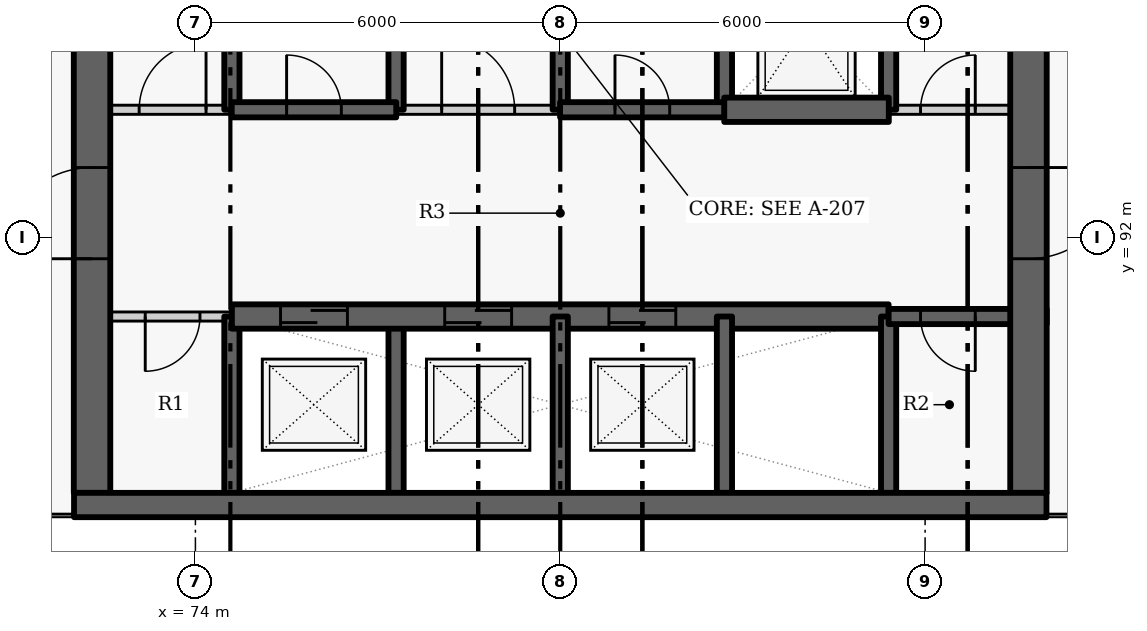
"""IFC4 building model, lengths in metres.
Left out: names, types, materials, properties, quantities, classifications, styles, units other than length and angle.
Written with IfcOpenShell. Run it as: python <this file> out.ifc"""

import sys

from ifc_helpers import new_model, si_unit, direction, frame, frame_2d, origin, place, context, subcontext, project, spatial, rectangle, extrude, element, fill, save


model = new_model("IFC4")
c1 = context("Model", 3, precision=1e-05, world=origin(), true_north=direction((0.0, 1.0)))
c2 = subcontext(c1, "Body", "Model", "MODEL_VIEW")
j1 = project(units=[si_unit("LENGTHUNIT", "METRE"), si_unit("PLANEANGLEUNIT", "RADIAN")], contexts=[c1])
p1 = place(None, origin())
s1 = spatial("IfcSite", under=j1, at=p1, CompositionType="ELEMENT")
p2 = place(p1, origin())
s2 = spatial("IfcBuilding", under=s1, at=p2, CompositionType="ELEMENT")
p3 = place(p2, frame((0.0, 0.0, 28.2)))
s3 = spatial("IfcBuildingStorey", under=s2, at=p3, CompositionType="ELEMENT", Elevation=28.2)
p4 = place(p3, frame((74.6, 87.8, -0.275), z_axis=(0.0, 0.0, 1.0), x_axis=(0.0, 1.0, 0.0)))
e1 = element("IfcWall", 1, at=p4, inside=s3, PredefinedType="SHEAR", context=c2, shape_type="SweptSolid", body=[
    extrude(rectangle(XDim=2.9, YDim=0.25, at=frame_2d((1.45, 0.0))), origin(), (0.0, 0.0, 1.0), 3.3),
])
p5 = place(p3, frame((74.6, 94.1, -0.275), z_axis=(0.0, 0.0, 1.0), x_axis=(0.0, 1.0, 0.0)))
e2 = element("IfcWall", 2, at=p5, inside=s3, PredefinedType="SHEAR", context=c2, shape_type="SweptSolid", body=[
    extrude(rectangle(XDim=2.8, YDim=0.25, at=frame_2d((1.4, 0.0))), origin(), (0.0, 0.0, 1.0), 3.3),
])
p6 = place(p3, frame((74.6, 90.7, 0.0), z_axis=(0.0, 0.0, 1.0), x_axis=(-1.0, 0.0, 0.0)))
e3 = element("IfcWall", 3, at=p6, inside=s3, PredefinedType="PARTITIONING", context=c2, shape_type="SweptSolid", body=[
    extrude(rectangle(XDim=2.6, YDim=0.15, at=frame_2d((1.3, 0.0))), origin(), (0.0, 0.0, 1.0), 3.025),
])
p7 = place(p6, frame((0.525, 0.0, 0.0)))
e4 = element("IfcOpeningElement", 4, at=p7, cuts=e3, PredefinedType="OPENING", context=c2, shape_type="SweptSolid", body=[
    extrude(rectangle(XDim=0.9, YDim=2.1, at=frame_2d((0.45, 1.05))), frame((0.0, 0.085, 0.0), z_axis=(0.0, -1.0, 0.0), x_axis=(1.0, 0.0, 0.0)), (0.0, 0.0, 1.0), 0.17),
])
p8 = place(p3, frame((72.3, 87.8, -0.275), z_axis=(0.0, 0.0, 1.0), x_axis=(0.0, 1.0, 0.0)))
e5 = element("IfcWall", 5, at=p8, inside=s3, PredefinedType="SHEAR", context=c2, shape_type="SweptSolid", body=[
    extrude(rectangle(XDim=9.1, YDim=0.6, at=frame_2d((4.55, 0.0))), origin(), (0.0, 0.0, 1.0), 3.3),
])
p9 = place(p8, frame((3.85, 0.0, 0.275)))
e6 = element("IfcOpeningElement", 6, at=p9, cuts=e5, PredefinedType="OPENING", context=c2, shape_type="SweptSolid", body=[
    extrude(rectangle(XDim=1.5, YDim=2.1, at=frame_2d((0.75, 1.05))), frame((0.0, 0.31, 0.0), z_axis=(0.0, -1.0, 0.0), x_axis=(1.0, 0.0, 0.0)), (0.0, 0.0, 1.0), 0.62),
])
p10 = place(p3, frame((77.3, 87.8, -0.275), z_axis=(0.0, 0.0, 1.0), x_axis=(0.0, 1.0, 0.0)))
e7 = element("IfcWall", 7, at=p10, inside=s3, PredefinedType="SHEAR", context=c2, shape_type="SweptSolid", body=[
    extrude(rectangle(XDim=2.9, YDim=0.25, at=frame_2d((1.45, 0.0))), origin(), (0.0, 0.0, 1.0), 3.3),
])
p11 = place(p3, frame((77.3, 94.1, -0.275), z_axis=(0.0, 0.0, 1.0), x_axis=(0.0, 1.0, 0.0)))
e8 = element("IfcWall", 8, at=p11, inside=s3, PredefinedType="SHEAR", context=c2, shape_type="SweptSolid", body=[
    extrude(rectangle(XDim=2.8, YDim=0.25, at=frame_2d((1.4, 0.0))), origin(), (0.0, 0.0, 1.0), 3.3),
])
p12 = place(p3, frame((74.6, 90.7, -0.275), z_axis=(0.0, 0.0, 1.0), x_axis=(1.0, 0.0, 0.0)))
e9 = element("IfcWall", 9, at=p12, inside=s3, PredefinedType="SHEAR", context=c2, shape_type="SweptSolid", body=[
    extrude(rectangle(XDim=10.8, YDim=0.4, at=frame_2d((5.4, 0.0))), origin(), (0.0, 0.0, 1.0), 3.3),
])
p13 = place(p12, frame((0.8, 0.0, 0.275)))
e10 = element("IfcOpeningElement", 10, at=p13, cuts=e9, PredefinedType="OPENING", context=c2, shape_type="SweptSolid", body=[
    extrude(rectangle(XDim=1.1, YDim=2.1, at=frame_2d((0.55, 1.05))), frame((0.0, 0.21, 0.0), z_axis=(0.0, -1.0, 0.0), x_axis=(1.0, 0.0, 0.0)), (0.0, 0.0, 1.0), 0.42),
])
p14 = place(p12, frame((3.5, 0.0, 0.275)))
e11 = element("IfcOpeningElement", 11, at=p14, cuts=e9, PredefinedType="OPENING", context=c2, shape_type="SweptSolid", body=[
    extrude(rectangle(XDim=1.1, YDim=2.1, at=frame_2d((0.55, 1.05))), frame((0.0, 0.21, 0.0), z_axis=(0.0, -1.0, 0.0), x_axis=(1.0, 0.0, 0.0)), (0.0, 0.0, 1.0), 0.42),
])
p15 = place(p12, frame((6.2, 0.0, 0.275)))
e12 = element("IfcOpeningElement", 12, at=p15, cuts=e9, PredefinedType="OPENING", context=c2, shape_type="SweptSolid", body=[
    extrude(rectangle(XDim=1.1, YDim=2.1, at=frame_2d((0.55, 1.05))), frame((0.0, 0.21, 0.0), z_axis=(0.0, -1.0, 0.0), x_axis=(1.0, 0.0, 0.0)), (0.0, 0.0, 1.0), 0.42),
])
p16 = place(p3, frame((80.0, 87.8, -0.275), z_axis=(0.0, 0.0, 1.0), x_axis=(0.0, 1.0, 0.0)))
e13 = element("IfcWall", 13, at=p16, inside=s3, PredefinedType="SHEAR", context=c2, shape_type="SweptSolid", body=[
    extrude(rectangle(XDim=2.9, YDim=0.25, at=frame_2d((1.45, 0.0))), origin(), (0.0, 0.0, 1.0), 3.3),
])
p17 = place(p3, frame((80.0, 94.1, -0.275), z_axis=(0.0, 0.0, 1.0), x_axis=(0.0, 1.0, 0.0)))
e14 = element("IfcWall", 14, at=p17, inside=s3, PredefinedType="SHEAR", context=c2, shape_type="SweptSolid", body=[
    extrude(rectangle(XDim=2.8, YDim=0.25, at=frame_2d((1.4, 0.0))), origin(), (0.0, 0.0, 1.0), 3.3),
])
p18 = place(p3, frame((82.7, 87.8, -0.275), z_axis=(0.0, 0.0, 1.0), x_axis=(0.0, 1.0, 0.0)))
e15 = element("IfcWall", 15, at=p18, inside=s3, PredefinedType="SHEAR", context=c2, shape_type="SweptSolid", body=[
    extrude(rectangle(XDim=2.9, YDim=0.25, at=frame_2d((1.45, 0.0))), origin(), (0.0, 0.0, 1.0), 3.3),
])
p19 = place(p3, frame((82.7, 94.1, -0.275), z_axis=(0.0, 0.0, 1.0), x_axis=(0.0, 1.0, 0.0)))
e16 = element("IfcWall", 16, at=p19, inside=s3, PredefinedType="SHEAR", context=c2, shape_type="SweptSolid", body=[
    extrude(rectangle(XDim=2.8, YDim=0.25, at=frame_2d((1.4, 0.0))), origin(), (0.0, 0.0, 1.0), 3.3),
])
p20 = place(p3, frame((85.4, 87.8, -0.275), z_axis=(0.0, 0.0, 1.0), x_axis=(0.0, 1.0, 0.0)))
e17 = element("IfcWall", 17, at=p20, inside=s3, PredefinedType="SHEAR", context=c2, shape_type="SweptSolid", body=[
    extrude(rectangle(XDim=2.9, YDim=0.25, at=frame_2d((1.45, 0.0))), origin(), (0.0, 0.0, 1.0), 3.3),
])
p21 = place(p3, frame((85.4, 94.1, -0.275), z_axis=(0.0, 0.0, 1.0), x_axis=(0.0, 1.0, 0.0)))
e18 = element("IfcWall", 18, at=p21, inside=s3, PredefinedType="SHEAR", context=c2, shape_type="SweptSolid", body=[
    extrude(rectangle(XDim=2.8, YDim=0.25, at=frame_2d((1.4, 0.0))), origin(), (0.0, 0.0, 1.0), 3.3),
])
p22 = place(p3, frame((88.0, 90.7, -0.275), z_axis=(0.0, 0.0, 1.0), x_axis=(-1.0, 0.0, 0.0)))
e19 = element("IfcWall", 19, at=p22, inside=s3, PredefinedType="SHEAR", context=c2, shape_type="SweptSolid", body=[
    extrude(rectangle(XDim=2.6, YDim=0.25, at=frame_2d((1.3, 0.0))), origin(), (0.0, 0.0, 1.0), 3.3),
])
p23 = place(p22, frame((1.175, 0.0, 0.275)))
e20 = element("IfcOpeningElement", 20, at=p23, cuts=e19, PredefinedType="OPENING", context=c2, shape_type="SweptSolid", body=[
    extrude(rectangle(XDim=0.9, YDim=2.1, at=frame_2d((0.45, 1.05))), frame((0.0, 0.135, 0.0), z_axis=(0.0, -1.0, 0.0), x_axis=(1.0, 0.0, 0.0)), (0.0, 0.0, 1.0), 0.27),
])
p24 = place(p3, frame((87.7, 103.4, -0.275), z_axis=(0.0, 0.0, 1.0), x_axis=(0.0, -1.0, 0.0)))
e21 = element("IfcWall", 21, at=p24, inside=s3, PredefinedType="SHEAR", context=c2, shape_type="SweptSolid", body=[
    extrude(rectangle(XDim=15.6, YDim=0.6, at=frame_2d((7.8, 0.0))), origin(), (0.0, 0.0, 1.0), 3.3),
])
p25 = place(p24, frame((10.25, 0.0, 0.275)))
e22 = element("IfcOpeningElement", 22, at=p25, cuts=e21, PredefinedType="OPENING", context=c2, shape_type="SweptSolid", body=[
    extrude(rectangle(XDim=1.5, YDim=2.1, at=frame_2d((0.75, 1.05))), frame((0.0, 0.31, 0.0), z_axis=(0.0, -1.0, 0.0), x_axis=(1.0, 0.0, 0.0)), (0.0, 0.0, 1.0), 0.62),
])
p26 = place(p24, frame((2.7, 0.0, 0.275)))
e23 = element("IfcOpeningElement", 23, at=p26, cuts=e21, PredefinedType="OPENING", context=c2, shape_type="SweptSolid", body=[
    extrude(rectangle(XDim=1.1, YDim=2.1, at=frame_2d((0.55, 1.05))), frame((0.0, 0.31, 0.0), z_axis=(0.0, -1.0, 0.0), x_axis=(1.0, 0.0, 0.0)), (0.0, 0.0, 1.0), 0.62),
])
p27 = place(p3, frame((72.0, 94.1, 0.0), z_axis=(0.0, 0.0, 1.0), x_axis=(1.0, 0.0, 0.0)))
e24 = element("IfcWall", 24, at=p27, inside=s3, PredefinedType="PARTITIONING", context=c2, shape_type="SweptSolid", body=[
    extrude(rectangle(XDim=2.603, YDim=0.15, at=frame_2d((1.302, 0.0))), origin(), (0.0, 0.0, 1.0), 3.025),
])
p28 = place(p27, frame((1.075, 0.0, 0.0)))
e25 = element("IfcOpeningElement", 25, at=p28, cuts=e24, PredefinedType="OPENING", context=c2, shape_type="SweptSolid", body=[
    extrude(rectangle(XDim=1.1, YDim=2.1, at=frame_2d((0.55, 1.05))), frame((0.0, 0.085, 0.0), z_axis=(0.0, -1.0, 0.0), x_axis=(1.0, 0.0, 0.0)), (0.0, 0.0, 1.0), 0.17),
])
p29 = place(p3, frame((77.297, 94.1, 0.0), z_axis=(0.0, 0.0, 1.0), x_axis=(1.0, 0.0, 0.0)))
e26 = element("IfcWall", 26, at=p29, inside=s3, PredefinedType="PARTITIONING", context=c2, shape_type="SweptSolid", body=[
    extrude(rectangle(XDim=2.706, YDim=0.15, at=frame_2d((1.353, 0.0))), origin(), (0.0, 0.0, 1.0), 3.025),
])
p30 = place(p29, frame((0.753, 0.0, 0.0)))
e27 = element("IfcOpeningElement", 27, at=p30, cuts=e26, PredefinedType="OPENING", context=c2, shape_type="SweptSolid", body=[
    extrude(rectangle(XDim=1.2, YDim=2.1, at=frame_2d((0.6, 1.05))), frame((0.0, 0.085, 0.0), z_axis=(0.0, -1.0, 0.0), x_axis=(1.0, 0.0, 0.0)), (0.0, 0.0, 1.0), 0.17),
])
p31 = place(p3, frame((85.397, 94.1, 0.0), z_axis=(0.0, 0.0, 1.0), x_axis=(1.0, 0.0, 0.0)))
e28 = element("IfcWall", 28, at=p31, inside=s3, PredefinedType="PARTITIONING", context=c2, shape_type="SweptSolid", body=[
    extrude(rectangle(XDim=2.603, YDim=0.15, at=frame_2d((1.302, 0.0))), origin(), (0.0, 0.0, 1.0), 3.025),
])
p32 = place(p31, frame((0.528, 0.0, 0.0)))
e29 = element("IfcOpeningElement", 29, at=p32, cuts=e28, PredefinedType="OPENING", context=c2, shape_type="SweptSolid", body=[
    extrude(rectangle(XDim=0.9, YDim=2.1, at=frame_2d((0.45, 1.05))), frame((0.0, 0.085, 0.0), z_axis=(0.0, -1.0, 0.0), x_axis=(1.0, 0.0, 0.0)), (0.0, 0.0, 1.0), 0.17),
])
p33 = place(p3, frame((74.597, 94.1, -0.275), z_axis=(0.0, 0.0, 1.0), x_axis=(1.0, 0.0, 0.0)))
e30 = element("IfcWall", 30, at=p33, inside=s3, PredefinedType="SHEAR", context=c2, shape_type="SweptSolid", body=[
    extrude(rectangle(XDim=2.706, YDim=0.25, at=frame_2d((1.353, 0.0))), origin(), (0.0, 0.0, 1.0), 3.3),
])
p34 = place(p33, frame((0.903, 0.0, 0.275)))
e31 = element("IfcOpeningElement", 31, at=p34, cuts=e30, PredefinedType="OPENING", context=c2, shape_type="SweptSolid", body=[
    extrude(rectangle(XDim=0.9, YDim=2.1, at=frame_2d((0.45, 1.05))), frame((0.0, 0.135, 0.0), z_axis=(0.0, -1.0, 0.0), x_axis=(1.0, 0.0, 0.0)), (0.0, 0.0, 1.0), 0.27),
])
p35 = place(p3, frame((79.997, 94.1, -0.275), z_axis=(0.0, 0.0, 1.0), x_axis=(1.0, 0.0, 0.0)))
e32 = element("IfcWall", 32, at=p35, inside=s3, PredefinedType="SHEAR", context=c2, shape_type="SweptSolid", body=[
    extrude(rectangle(XDim=2.706, YDim=0.25, at=frame_2d((1.353, 0.0))), origin(), (0.0, 0.0, 1.0), 3.3),
])
p36 = place(p35, frame((0.903, 0.0, 0.275)))
e33 = element("IfcOpeningElement", 33, at=p36, cuts=e32, PredefinedType="OPENING", context=c2, shape_type="SweptSolid", body=[
    extrude(rectangle(XDim=0.9, YDim=2.1, at=frame_2d((0.45, 1.05))), frame((0.0, 0.135, 0.0), z_axis=(0.0, -1.0, 0.0), x_axis=(1.0, 0.0, 0.0)), (0.0, 0.0, 1.0), 0.27),
])
p37 = place(p3, frame((82.697, 94.1, -0.275), z_axis=(0.0, 0.0, 1.0), x_axis=(1.0, 0.0, 0.0)))
e34 = element("IfcWall", 34, at=p37, inside=s3, PredefinedType="SHEAR", context=c2, shape_type="SweptSolid", body=[
    extrude(rectangle(XDim=2.706, YDim=0.4, at=frame_2d((1.353, 0.0))), origin(), (0.0, 0.0, 1.0), 3.3),
])
p38 = place(p3, frame((72.004, 87.6, -0.275), z_axis=(0.0, 0.0, 1.0), x_axis=(1.0, 0.0, 0.0)))
e35 = element("IfcWall", 35, at=p38, inside=s3, PredefinedType="SHEAR", context=c2, shape_type="SweptSolid", body=[
    extrude(rectangle(XDim=15.992, YDim=0.4, at=frame_2d((7.996, 0.0))), origin(), (0.0, 0.0, 1.0), 3.3),
])
p39 = place(p7, origin())
e36 = element("IfcDoor", 36, at=p39, inside=s3, OperationType="SINGLE_SWING_RIGHT", PredefinedType="DOOR", context=c2, shape_type="SweptSolid", body=[
    extrude(rectangle(XDim=0.9, YDim=2.1, at=frame_2d((0.45, 1.05))), frame((0.0, 0.025, 0.0), z_axis=(0.0, -1.0, 0.0), x_axis=(1.0, 0.0, 0.0)), (0.0, 0.0, 1.0), 0.05),
])
fill(e4, e36)
p40 = place(p13, origin())
e37 = element("IfcDoor", 37, at=p40, inside=s3, OperationType="SLIDING_TO_LEFT", PredefinedType="DOOR", context=c2, shape_type="SweptSolid", body=[
    extrude(rectangle(XDim=1.1, YDim=2.1, at=frame_2d((0.55, 1.05))), frame((0.0, 0.025, 0.0), z_axis=(0.0, -1.0, 0.0), x_axis=(1.0, 0.0, 0.0)), (0.0, 0.0, 1.0), 0.05),
])
fill(e10, e37)
p41 = place(p14, origin())
e38 = element("IfcDoor", 38, at=p41, inside=s3, OperationType="SLIDING_TO_LEFT", PredefinedType="DOOR", context=c2, shape_type="SweptSolid", body=[
    extrude(rectangle(XDim=1.1, YDim=2.1, at=frame_2d((0.55, 1.05))), frame((0.0, 0.025, 0.0), z_axis=(0.0, -1.0, 0.0), x_axis=(1.0, 0.0, 0.0)), (0.0, 0.0, 1.0), 0.05),
])
fill(e11, e38)
p42 = place(p15, origin())
e39 = element("IfcDoor", 39, at=p42, inside=s3, OperationType="SLIDING_TO_LEFT", PredefinedType="DOOR", context=c2, shape_type="SweptSolid", body=[
    extrude(rectangle(XDim=1.1, YDim=2.1, at=frame_2d((0.55, 1.05))), frame((0.0, 0.025, 0.0), z_axis=(0.0, -1.0, 0.0), x_axis=(1.0, 0.0, 0.0)), (0.0, 0.0, 1.0), 0.05),
])
fill(e12, e39)
p43 = place(p23, origin())
e40 = element("IfcDoor", 40, at=p43, inside=s3, OperationType="SINGLE_SWING_LEFT", PredefinedType="DOOR", context=c2, shape_type="SweptSolid", body=[
    extrude(rectangle(XDim=0.9, YDim=2.1, at=frame_2d((0.45, 1.05))), frame((0.0, 0.025, 0.0), z_axis=(0.0, -1.0, 0.0), x_axis=(1.0, 0.0, 0.0)), (0.0, 0.0, 1.0), 0.05),
])
fill(e20, e40)
p44 = place(p28, origin())
e41 = element("IfcDoor", 41, at=p44, inside=s3, OperationType="SINGLE_SWING_RIGHT", PredefinedType="DOOR", context=c2, shape_type="SweptSolid", body=[
    extrude(rectangle(XDim=1.1, YDim=2.1, at=frame_2d((0.55, 1.05))), frame((0.0, 0.025, 0.0), z_axis=(0.0, -1.0, 0.0), x_axis=(1.0, 0.0, 0.0)), (0.0, 0.0, 1.0), 0.05),
])
fill(e25, e41)
p45 = place(p34, origin())
e42 = element("IfcDoor", 42, at=p45, inside=s3, OperationType="SINGLE_SWING_LEFT", PredefinedType="DOOR", context=c2, shape_type="SweptSolid", body=[
    extrude(rectangle(XDim=0.9, YDim=2.1, at=frame_2d((0.45, 1.05))), frame((0.0, 0.025, 0.0), z_axis=(0.0, -1.0, 0.0), x_axis=(1.0, 0.0, 0.0)), (0.0, 0.0, 1.0), 0.05),
])
fill(e31, e42)
p46 = place(p30, origin())
e43 = element("IfcDoor", 43, at=p46, inside=s3, OperationType="DOUBLE_DOOR_SINGLE_SWING", PredefinedType="DOOR", context=c2, shape_type="SweptSolid", body=[
    extrude(rectangle(XDim=1.2, YDim=2.1, at=frame_2d((0.6, 1.05))), frame((0.0, 0.025, 0.0), z_axis=(0.0, -1.0, 0.0), x_axis=(1.0, 0.0, 0.0)), (0.0, 0.0, 1.0), 0.05),
])
fill(e27, e43)
p47 = place(p36, origin())
e44 = element("IfcDoor", 44, at=p47, inside=s3, OperationType="SINGLE_SWING_LEFT", PredefinedType="DOOR", context=c2, shape_type="SweptSolid", body=[
    extrude(rectangle(XDim=0.9, YDim=2.1, at=frame_2d((0.45, 1.05))), frame((0.0, 0.025, 0.0), z_axis=(0.0, -1.0, 0.0), x_axis=(1.0, 0.0, 0.0)), (0.0, 0.0, 1.0), 0.05),
])
fill(e33, e44)
p48 = place(p32, origin())
e45 = element("IfcDoor", 45, at=p48, inside=s3, OperationType="SINGLE_SWING_RIGHT", PredefinedType="DOOR", context=c2, shape_type="SweptSolid", body=[
    extrude(rectangle(XDim=0.9, YDim=2.1, at=frame_2d((0.45, 1.05))), frame((0.0, 0.025, 0.0), z_axis=(0.0, -1.0, 0.0), x_axis=(1.0, 0.0, 0.0)), (0.0, 0.0, 1.0), 0.05),
])
fill(e29, e45)
p49 = place(p25, origin())
e46 = element("IfcDoor", 46, at=p49, inside=s3, OperationType="DOUBLE_DOOR_SINGLE_SWING", PredefinedType="DOOR", context=c2, shape_type="SweptSolid", body=[
    extrude(rectangle(XDim=1.5, YDim=2.1, at=frame_2d((0.75, 1.05))), frame((0.0, 0.025, 0.0), z_axis=(0.0, -1.0, 0.0), x_axis=(1.0, 0.0, 0.0)), (0.0, 0.0, 1.0), 0.05),
])
fill(e22, e46)
p50 = place(p9, origin())
e47 = element("IfcDoor", 47, at=p50, inside=s3, OperationType="DOUBLE_DOOR_SINGLE_SWING", PredefinedType="DOOR", context=c2, shape_type="SweptSolid", body=[
    extrude(rectangle(XDim=1.5, YDim=2.1, at=frame_2d((0.75, 1.05))), frame((0.0, 0.025, 0.0), z_axis=(0.0, -1.0, 0.0), x_axis=(1.0, 0.0, 0.0)), (0.0, 0.0, 1.0), 0.05),
])
fill(e6, e47)
save(model, sys.argv[1])
